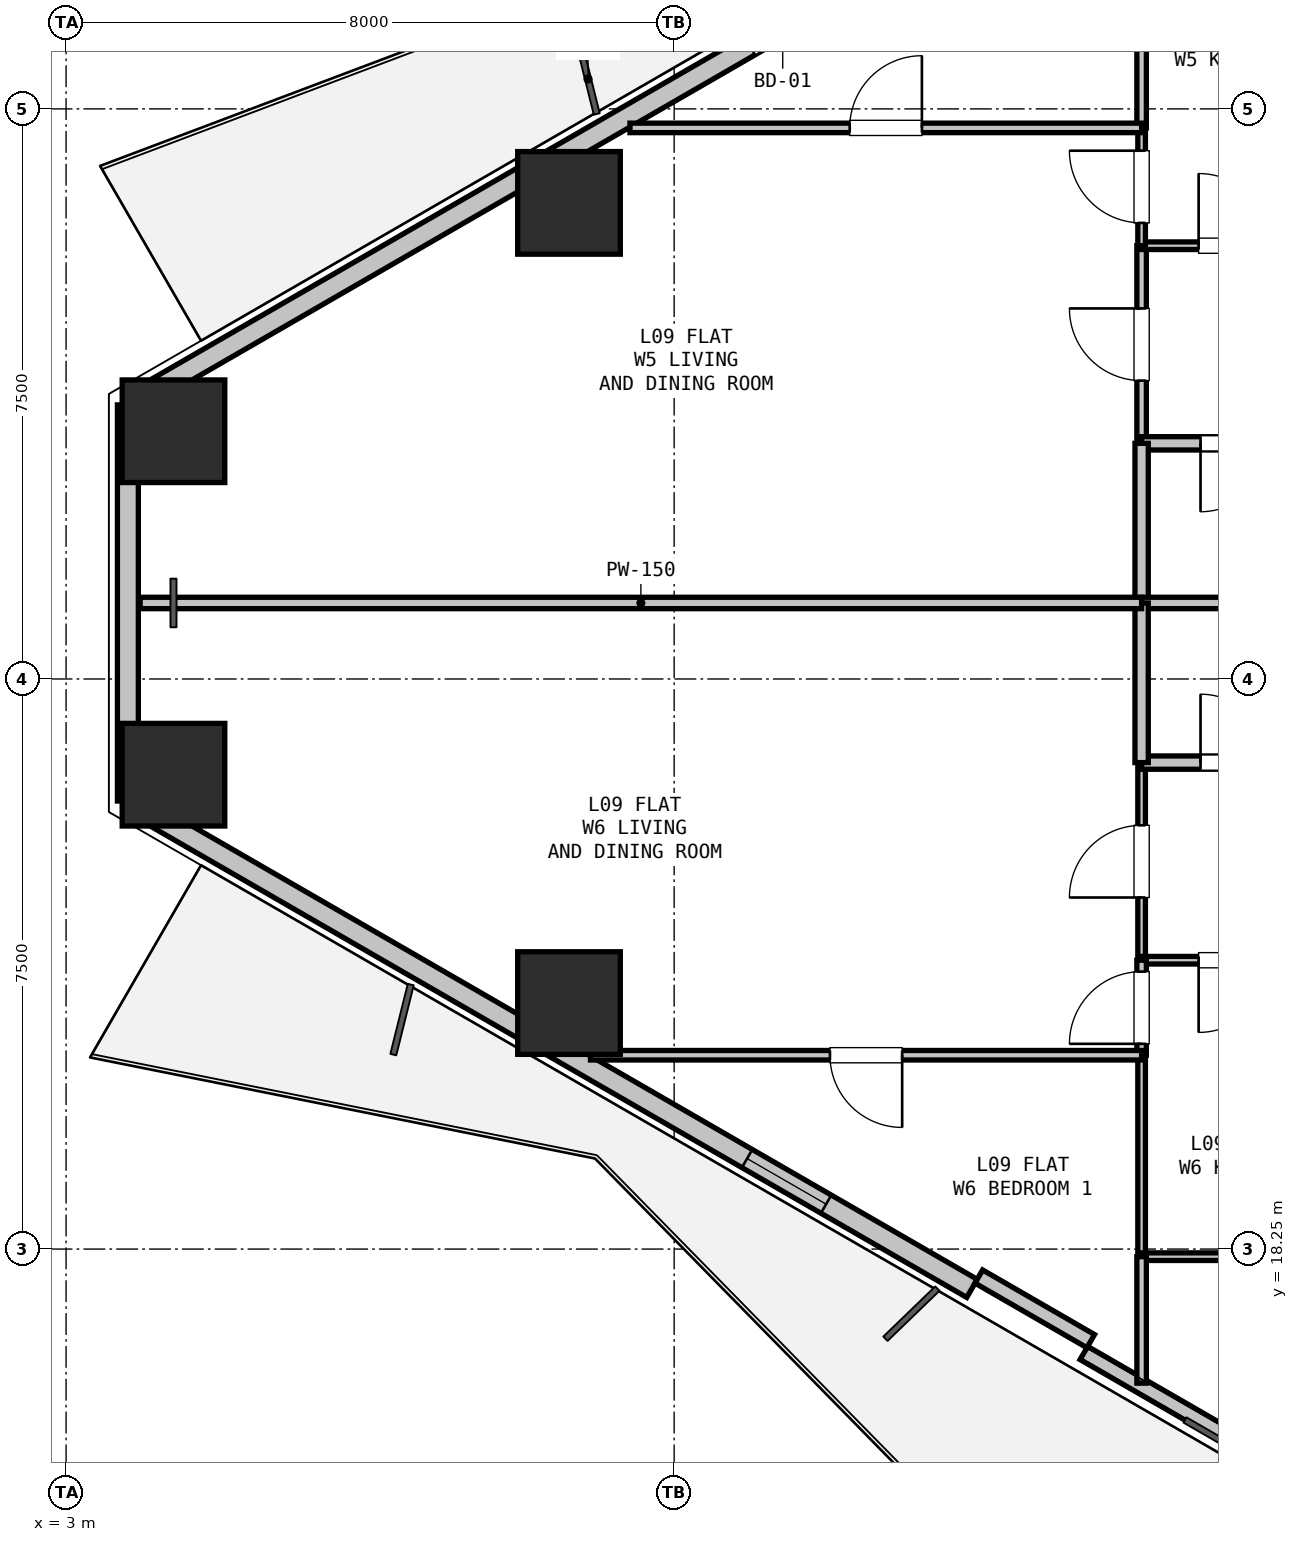
"""IFC4 building model, lengths in metres.
Left out: names, types, materials, properties, quantities, classifications, styles, units other than length and angle.
Written with IfcOpenShell. Run it as: python <this file> out.ifc"""

import sys

from ifc_helpers import new_model, si_unit, direction, frame, frame_2d, origin, origin_2d, place, context, subcontext, project, spatial, rectangle, hollow_rectangle, extrude, element, fill, save


model = new_model("IFC4")
c1 = context("Model", 3, precision=1e-05, world=origin(), true_north=direction((0.0, 1.0)))
c2 = subcontext(c1, "Body", "Model", "MODEL_VIEW")
j1 = project(units=[si_unit("LENGTHUNIT", "METRE"), si_unit("PLANEANGLEUNIT", "RADIAN")], contexts=[c1])
p1 = place(None, origin())
s1 = spatial("IfcSite", under=j1, at=p1, CompositionType="ELEMENT")
p2 = place(p1, origin())
s2 = spatial("IfcBuilding", under=s1, at=p2, CompositionType="ELEMENT")
p3 = place(p2, frame((0.0, 0.0, 35.7)))
s3 = spatial("IfcBuildingStorey", under=s2, at=p3, CompositionType="ELEMENT", Elevation=35.7)
for number, where, z_axis, x_axis in (
    (1, (4.413, 29.009, 0.0), (0.0, 0.0, 1.0), (1.0, 0.0, 0.0)),
    (2, (9.617, 32.014, 0.0), (0.0, 0.0, 1.0), (1.0, 0.0, 0.0)),
    (3, (9.617, 21.486, 0.0), (0.0, 0.0, 1.0), (1.0, 0.0, 0.0)),
    (4, (4.413, 24.491, 0.0), (0.0, 0.0, 1.0), (1.0, 0.0, 0.0)),
):
    element("IfcColumn", number, at=place(p3, frame(where, z_axis=z_axis, x_axis=x_axis)), inside=s3, PredefinedType="COLUMN", context=c2, shape_type="SweptSolid", body=[
        extrude(hollow_rectangle(XDim=1.35, YDim=1.35, WallThickness=0.036, at=origin_2d()), origin(), (0.0, 0.0, 1.0), 3.3),
    ])
p4 = place(p3, frame((3.813, 24.144, 0.0), z_axis=(0.0, 0.0, 1.0), x_axis=(0.0, 1.0, 0.0)))
e5 = element("IfcWall", 5, at=p4, inside=s3, PredefinedType="SOLIDWALL", context=c2, shape_type="SweptSolid", body=[
    extrude(rectangle(XDim=5.211, YDim=0.275, at=frame_2d((2.606, 0.0))), origin(), (0.0, 0.0, 1.0), 2.66),
])
p5 = place(p3, frame((3.943, 29.431, 0.0), z_axis=(0.0, 0.0, 1.0), x_axis=(0.866027105532, 0.499997052475, 0.0)))
e6 = element("IfcWall", 6, at=p5, inside=s3, PredefinedType="SOLIDWALL", context=c2, shape_type="SweptSolid", body=[
    extrude(rectangle(XDim=12.673, YDim=0.275, at=frame_2d((6.336, 0.0))), origin(), (0.0, 0.0, 1.0), 2.66),
])
p6 = place(p5, frame((9.298, 0.0, 0.0)))
e7 = element("IfcOpeningElement", 7, at=p6, cuts=e6, PredefinedType="OPENING", context=c2, shape_type="SweptSolid", body=[
    extrude(rectangle(XDim=1.0, YDim=2.1, at=frame_2d((0.5, 1.05))), frame((0.0, 0.147, 0.0), z_axis=(0.0, -1.0, 0.0), x_axis=(1.0, 0.0, 0.0)), (0.0, 0.0, 1.0), 0.295),
])
p7 = place(p3, frame((26.76, 10.896, 0.0), z_axis=(0.0, 0.0, 1.0), x_axis=(-0.866027351828, 0.499996625875, 0.0)))
e8 = element("IfcWall", 8, at=p7, inside=s3, PredefinedType="PARAPET", context=c2, shape_type="SweptSolid", body=[
    extrude(rectangle(XDim=11.973, YDim=0.2, at=frame_2d((5.987, 0.0))), origin(), (0.0, 0.0, 1.0), 0.2),
])
p8 = place(p3, frame((14.918, 17.733, 0.0), z_axis=(0.0, 0.0, 1.0), x_axis=(-0.866027105532, 0.499997052475, 0.0)))
e9 = element("IfcWall", 9, at=p8, inside=s3, PredefinedType="SOLIDWALL", context=c2, shape_type="SweptSolid", body=[
    extrude(rectangle(XDim=12.673, YDim=0.275, at=frame_2d((6.336, 0.0))), origin(), (0.0, 0.0, 1.0), 2.66),
])
p9 = place(p8, frame((2.216, 0.0, 0.9)))
e10 = element("IfcOpeningElement", 10, at=p9, cuts=e9, PredefinedType="OPENING", context=c2, shape_type="SweptSolid", body=[
    extrude(rectangle(XDim=1.2, YDim=1.4, at=frame_2d((0.6, 0.7))), frame((0.0, 0.147, 0.0), z_axis=(0.0, -1.0, 0.0), x_axis=(1.0, 0.0, 0.0)), (0.0, 0.0, 1.0), 0.295),
])
p10 = place(p3, frame((16.48, 17.039, 0.0), z_axis=(0.0, 0.0, 1.0), x_axis=(-0.86605165483, 0.499954529098, 0.0)))
e11 = element("IfcWall", 11, at=p10, inside=s3, PredefinedType="PARAPET", context=c2, shape_type="SweptSolid", body=[
    extrude(rectangle(XDim=1.7, YDim=0.2, at=frame_2d((0.85, 0.0))), origin(), (0.0, 0.0, 1.0), 2.66),
])
p11 = place(p3, frame((17.15, 28.85, 0.0), z_axis=(0.0, 0.0, 1.0), x_axis=(0.0, 1.0, 0.0)))
e12 = element("IfcWall", 12, at=p11, inside=s3, PredefinedType="PARTITIONING", context=c2, shape_type="SweptSolid", body=[
    extrude(rectangle(XDim=2.6, YDim=0.125, at=frame_2d((1.3, 0.0))), origin(), (0.0, 0.0, 1.0), 3.04),
])
p12 = place(p11, frame((0.825, 0.0, 0.0)))
e13 = element("IfcOpeningElement", 13, at=p12, cuts=e12, PredefinedType="OPENING", context=c2, shape_type="SweptSolid", body=[
    extrude(rectangle(XDim=0.95, YDim=2.1, at=frame_2d((0.475, 1.05))), frame((0.0, 0.073, 0.0), z_axis=(0.0, -1.0, 0.0), x_axis=(1.0, 0.0, 0.0)), (0.0, 0.0, 1.0), 0.145),
])
p13 = place(p3, frame((17.15, 31.45, 0.0), z_axis=(0.0, 0.0, 1.0), x_axis=(1.0, 0.0, 0.0)))
e14 = element("IfcWall", 14, at=p13, inside=s3, PredefinedType="PARTITIONING", context=c2, shape_type="SweptSolid", body=[
    extrude(rectangle(XDim=2.45, YDim=0.1, at=frame_2d((1.225, 0.0))), origin(), (0.0, 0.0, 1.0), 3.04),
])
p14 = place(p13, frame((0.75, 0.0, 0.0)))
e15 = element("IfcOpeningElement", 15, at=p14, cuts=e14, PredefinedType="OPENING", context=c2, shape_type="SweptSolid", body=[
    extrude(rectangle(XDim=0.95, YDim=2.1, at=frame_2d((0.475, 1.05))), frame((0.0, 0.06, 0.0), z_axis=(0.0, -1.0, 0.0), x_axis=(1.0, 0.0, 0.0)), (0.0, 0.0, 1.0), 0.12),
])
p15 = place(p3, frame((19.6, 28.85, 0.0), z_axis=(0.0, 0.0, 1.0), x_axis=(-1.0, 0.0, 0.0)))
e16 = element("IfcWall", 16, at=p15, inside=s3, PredefinedType="PLUMBINGWALL", context=c2, shape_type="SweptSolid", body=[
    extrude(rectangle(XDim=2.45, YDim=0.175, at=frame_2d((1.225, 0.0))), origin(), (0.0, 0.0, 1.0), 3.04),
])
p16 = place(p15, frame((0.775, 0.0, 0.0)))
e17 = element("IfcOpeningElement", 17, at=p16, cuts=e16, PredefinedType="OPENING", context=c2, shape_type="SweptSolid", body=[
    extrude(rectangle(XDim=0.9, YDim=2.1, at=frame_2d((0.45, 1.05))), frame((0.0, 0.097, 0.0), z_axis=(0.0, -1.0, 0.0), x_axis=(1.0, 0.0, 0.0)), (0.0, 0.0, 1.0), 0.195),
])
p17 = place(p3, frame((17.15, 22.05, 0.0), z_axis=(0.0, 0.0, 1.0), x_axis=(0.0, 1.0, 0.0)))
e18 = element("IfcWall", 18, at=p17, inside=s3, PredefinedType="PARTITIONING", context=c2, shape_type="SweptSolid", body=[
    extrude(rectangle(XDim=2.6, YDim=0.1, at=frame_2d((1.3, 0.0))), origin(), (0.0, 0.0, 1.0), 3.04),
])
p18 = place(p17, frame((0.825, 0.0, 0.0)))
e19 = element("IfcOpeningElement", 19, at=p18, cuts=e18, PredefinedType="OPENING", context=c2, shape_type="SweptSolid", body=[
    extrude(rectangle(XDim=0.95, YDim=2.1, at=frame_2d((0.475, 1.05))), frame((0.0, 0.06, 0.0), z_axis=(0.0, -1.0, 0.0), x_axis=(1.0, 0.0, 0.0)), (0.0, 0.0, 1.0), 0.12),
])
p19 = place(p3, frame((17.15, 24.65, 0.0), z_axis=(0.0, 0.0, 1.0), x_axis=(1.0, 0.0, 0.0)))
e20 = element("IfcWall", 20, at=p19, inside=s3, PredefinedType="PLUMBINGWALL", context=c2, shape_type="SweptSolid", body=[
    extrude(rectangle(XDim=2.45, YDim=0.175, at=frame_2d((1.225, 0.0))), origin(), (0.0, 0.0, 1.0), 3.04),
])
p20 = place(p19, frame((0.775, 0.0, 0.0)))
e21 = element("IfcOpeningElement", 21, at=p20, cuts=e20, PredefinedType="OPENING", context=c2, shape_type="SweptSolid", body=[
    extrude(rectangle(XDim=0.9, YDim=2.1, at=frame_2d((0.45, 1.05))), frame((0.0, 0.097, 0.0), z_axis=(0.0, -1.0, 0.0), x_axis=(1.0, 0.0, 0.0)), (0.0, 0.0, 1.0), 0.195),
])
p21 = place(p3, frame((19.6, 22.05, 0.0), z_axis=(0.0, 0.0, 1.0), x_axis=(-1.0, 0.0, 0.0)))
e22 = element("IfcWall", 22, at=p21, inside=s3, PredefinedType="PARTITIONING", context=c2, shape_type="SweptSolid", body=[
    extrude(rectangle(XDim=2.45, YDim=0.1, at=frame_2d((1.225, 0.0))), origin(), (0.0, 0.0, 1.0), 3.04),
])
p22 = place(p21, frame((0.75, 0.0, 0.0)))
e23 = element("IfcOpeningElement", 23, at=p22, cuts=e22, PredefinedType="OPENING", context=c2, shape_type="SweptSolid", body=[
    extrude(rectangle(XDim=0.95, YDim=2.1, at=frame_2d((0.475, 1.05))), frame((0.0, 0.06, 0.0), z_axis=(0.0, -1.0, 0.0), x_axis=(1.0, 0.0, 0.0)), (0.0, 0.0, 1.0), 0.12),
])
p23 = place(p3, frame((17.15, 26.75, 0.0), z_axis=(0.0, 0.0, 1.0), x_axis=(0.0, 1.0, 0.0)))
e24 = element("IfcWall", 24, at=p23, inside=s3, PredefinedType="PLUMBINGWALL", context=c2, shape_type="SweptSolid", body=[
    extrude(rectangle(XDim=2.1, YDim=0.175, at=frame_2d((1.05, 0.0))), origin(), (0.0, 0.0, 1.0), 3.04),
])
p24 = place(p3, frame((19.6, 26.75, 0.0), z_axis=(0.0, 0.0, 1.0), x_axis=(-1.0, 0.0, 0.0)))
e25 = element("IfcWall", 25, at=p24, inside=s3, PredefinedType="PARTITIONING", context=c2, shape_type="SweptSolid", body=[
    extrude(rectangle(XDim=2.45, YDim=0.15, at=frame_2d((1.225, 0.0))), origin(), (0.0, 0.0, 1.0), 3.04),
])
p25 = place(p3, frame((17.15, 31.45, 0.0), z_axis=(0.0, 0.0, 1.0), x_axis=(0.0, 1.0, 0.0)))
e26 = element("IfcWall", 26, at=p25, inside=s3, PredefinedType="PARTITIONING", context=c2, shape_type="SweptSolid", body=[
    extrude(rectangle(XDim=1.55, YDim=0.1, at=frame_2d((0.775, 0.0))), origin(), (0.0, 0.0, 1.0), 2.338),
])
p26 = place(p25, frame((0.3, 0.0, 0.0)))
e27 = element("IfcOpeningElement", 27, at=p26, cuts=e26, PredefinedType="OPENING", context=c2, shape_type="SweptSolid", body=[
    extrude(rectangle(XDim=0.95, YDim=2.1, at=frame_2d((0.475, 1.05))), frame((0.0, 0.06, 0.0), z_axis=(0.0, -1.0, 0.0), x_axis=(1.0, 0.0, 0.0)), (0.0, 0.0, 1.0), 0.12),
])
p27 = place(p3, frame((17.15, 33.0, 0.0), z_axis=(0.0, 0.0, 1.0), x_axis=(0.0, 1.0, 0.0)))
e28 = element("IfcWall", 28, at=p27, inside=s3, PredefinedType="PARTITIONING", context=c2, shape_type="SweptSolid", body=[
    extrude(rectangle(XDim=2.35, YDim=0.125, at=frame_2d((1.175, 0.0))), origin(), (0.0, 0.0, 1.0), 3.04),
])
p28 = place(p3, frame((17.15, 24.65, 0.0), z_axis=(0.0, 0.0, 1.0), x_axis=(0.0, 1.0, 0.0)))
e29 = element("IfcWall", 29, at=p28, inside=s3, PredefinedType="PLUMBINGWALL", context=c2, shape_type="SweptSolid", body=[
    extrude(rectangle(XDim=2.1, YDim=0.175, at=frame_2d((1.05, 0.0))), origin(), (0.0, 0.0, 1.0), 3.04),
])
p29 = place(p3, frame((17.15, 18.15, 0.0), z_axis=(0.0, 0.0, 1.0), x_axis=(0.0, 1.0, 0.0)))
e30 = element("IfcWall", 30, at=p29, inside=s3, PredefinedType="PARTITIONING", context=c2, shape_type="SweptSolid", body=[
    extrude(rectangle(XDim=2.65, YDim=0.1, at=frame_2d((1.325, 0.0))), origin(), (0.0, 0.0, 1.0), 3.04),
])
p30 = place(p3, frame((17.15, 20.8, 0.0), z_axis=(0.0, 0.0, 1.0), x_axis=(0.0, 1.0, 0.0)))
e31 = element("IfcWall", 31, at=p30, inside=s3, PredefinedType="PARTITIONING", context=c2, shape_type="SweptSolid", body=[
    extrude(rectangle(XDim=1.25, YDim=0.125, at=frame_2d((0.625, 0.0))), origin(), (0.0, 0.0, 1.0), 2.338),
])
p31 = place(p30, frame((0.15, 0.0, 0.0)))
e32 = element("IfcOpeningElement", 32, at=p31, cuts=e31, PredefinedType="OPENING", context=c2, shape_type="SweptSolid", body=[
    extrude(rectangle(XDim=0.95, YDim=2.1, at=frame_2d((0.475, 1.05))), frame((0.0, 0.073, 0.0), z_axis=(0.0, -1.0, 0.0), x_axis=(1.0, 0.0, 0.0)), (0.0, 0.0, 1.0), 0.145),
])
p32 = place(p3, frame((19.6, 18.15, 0.0), z_axis=(0.0, 0.0, 1.0), x_axis=(-1.0, 0.0, 0.0)))
e33 = element("IfcWall", 33, at=p32, inside=s3, PredefinedType="PARTITIONING", context=c2, shape_type="SweptSolid", body=[
    extrude(rectangle(XDim=2.45, YDim=0.1, at=frame_2d((1.225, 0.0))), origin(), (0.0, 0.0, 1.0), 3.04),
])
p33 = place(p3, frame((10.419, 33.0, 0.0), z_axis=(0.0, 0.0, 1.0), x_axis=(1.0, 0.0, 0.0)))
e34 = element("IfcWall", 34, at=p33, inside=s3, PredefinedType="PARTITIONING", context=c2, shape_type="SweptSolid", body=[
    extrude(rectangle(XDim=6.731, YDim=0.125, at=frame_2d((3.365, 0.0))), origin(), (0.0, 0.0, 1.0), 2.365),
])
p34 = place(p33, frame((2.89, 0.0, 0.0)))
e35 = element("IfcOpeningElement", 35, at=p34, cuts=e34, PredefinedType="OPENING", context=c2, shape_type="SweptSolid", body=[
    extrude(rectangle(XDim=0.95, YDim=2.1, at=frame_2d((0.475, 1.05))), frame((0.0, 0.073, 0.0), z_axis=(0.0, -1.0, 0.0), x_axis=(1.0, 0.0, 0.0)), (0.0, 0.0, 1.0), 0.145),
])
p35 = place(p3, frame((17.15, 26.75, 0.0), z_axis=(0.0, 0.0, 1.0), x_axis=(-1.0, 0.0, 0.0)))
e36 = element("IfcWall", 36, at=p35, inside=s3, PredefinedType="PARTITIONING", context=c2, shape_type="SweptSolid", body=[
    extrude(rectangle(XDim=13.175, YDim=0.15, at=frame_2d((6.588, 0.0))), origin(), (0.0, 0.0, 1.0), 2.65),
])
p36 = place(p3, frame((3.813, 29.356, 0.0), z_axis=(0.0, 0.0, 1.0), x_axis=(0.866131372301, 0.499816412211, 0.0)))
e37 = element("IfcWall", 37, at=p36, inside=s3, PredefinedType="PARTITIONING", context=c2, shape_type="SweptSolid", body=[
    extrude(rectangle(XDim=0.15, YDim=0.125, at=frame_2d((0.075, 0.0))), origin(), (0.0, 0.0, 1.0), 3.04),
])
p37 = place(p3, frame((17.15, 20.8, 0.0), z_axis=(0.0, 0.0, 1.0), x_axis=(-1.0, 0.0, 0.0)))
e38 = element("IfcWall", 38, at=p37, inside=s3, PredefinedType="PARTITIONING", context=c2, shape_type="SweptSolid", body=[
    extrude(rectangle(XDim=7.25, YDim=0.125, at=frame_2d((3.625, 0.0))), origin(), (0.0, 0.0, 1.0), 2.365),
])
p38 = place(p37, frame((3.15, 0.0, 0.0)))
e39 = element("IfcOpeningElement", 39, at=p38, cuts=e38, PredefinedType="OPENING", context=c2, shape_type="SweptSolid", body=[
    extrude(rectangle(XDim=0.95, YDim=2.1, at=frame_2d((0.475, 1.05))), frame((0.0, 0.073, 0.0), z_axis=(0.0, -1.0, 0.0), x_axis=(1.0, 0.0, 0.0)), (0.0, 0.0, 1.0), 0.145),
])
p39 = place(p3, frame((3.943, 24.069, 0.0), z_axis=(0.0, 0.0, 1.0), x_axis=(-0.866131372301, 0.499816412211, 0.0)))
e40 = element("IfcWall", 40, at=p39, inside=s3, PredefinedType="PARTITIONING", context=c2, shape_type="SweptSolid", body=[
    extrude(rectangle(XDim=0.15, YDim=0.1, at=frame_2d((0.075, 0.0))), origin(), (0.0, 0.0, 1.0), 3.04),
])
p40 = place(p3, frame((17.15, 18.15, 0.0), z_axis=(0.0, 0.0, 1.0), x_axis=(0.0, -1.0, 0.0)))
e41 = element("IfcWall", 41, at=p40, inside=s3, PredefinedType="PARTITIONING", context=c2, shape_type="SweptSolid", body=[
    extrude(rectangle(XDim=1.664, YDim=0.125, at=frame_2d((0.832, 0.0))), origin(), (0.0, 0.0, 1.0), 2.365),
])
p41 = place(p9, origin())
e42 = element("IfcWindow", 42, at=p41, inside=s3, PartitioningType="SINGLE_PANEL", PredefinedType="WINDOW", context=c2, shape_type="SweptSolid", body=[
    extrude(rectangle(XDim=1.2, YDim=1.4, at=frame_2d((0.6, 0.7))), frame((0.0, 0.03, 0.0), z_axis=(0.0, -1.0, 0.0), x_axis=(1.0, 0.0, 0.0)), (0.0, 0.0, 1.0), 0.06),
])
fill(e10, e42)
p42 = place(p16, origin())
e43 = element("IfcDoor", 43, at=p42, inside=s3, OperationType="SINGLE_SWING_RIGHT", PredefinedType="DOOR", context=c2, shape_type="SweptSolid", body=[
    extrude(rectangle(XDim=0.9, YDim=2.1, at=frame_2d((0.45, 1.05))), frame((0.0, 0.025, 0.0), z_axis=(0.0, -1.0, 0.0), x_axis=(1.0, 0.0, 0.0)), (0.0, 0.0, 1.0), 0.05),
])
fill(e17, e43)
p43 = place(p14, origin())
e44 = element("IfcDoor", 44, at=p43, inside=s3, OperationType="SINGLE_SWING_LEFT", PredefinedType="DOOR", context=c2, shape_type="SweptSolid", body=[
    extrude(rectangle(XDim=0.95, YDim=2.1, at=frame_2d((0.475, 1.05))), frame((0.0, 0.025, 0.0), z_axis=(0.0, -1.0, 0.0), x_axis=(1.0, 0.0, 0.0)), (0.0, 0.0, 1.0), 0.05),
])
fill(e15, e44)
p44 = place(p12, origin())
e45 = element("IfcDoor", 45, at=p44, inside=s3, OperationType="SINGLE_SWING_RIGHT", PredefinedType="DOOR", context=c2, shape_type="SweptSolid", body=[
    extrude(rectangle(XDim=0.95, YDim=2.1, at=frame_2d((0.475, 1.05))), frame((0.0, 0.025, 0.0), z_axis=(0.0, -1.0, 0.0), x_axis=(1.0, 0.0, 0.0)), (0.0, 0.0, 1.0), 0.05),
])
fill(e13, e45)
p45 = place(p20, origin())
e46 = element("IfcDoor", 46, at=p45, inside=s3, OperationType="SINGLE_SWING_LEFT", PredefinedType="DOOR", context=c2, shape_type="SweptSolid", body=[
    extrude(rectangle(XDim=0.9, YDim=2.1, at=frame_2d((0.45, 1.05))), frame((0.0, 0.025, 0.0), z_axis=(0.0, -1.0, 0.0), x_axis=(1.0, 0.0, 0.0)), (0.0, 0.0, 1.0), 0.05),
])
fill(e21, e46)
p46 = place(p22, origin())
e47 = element("IfcDoor", 47, at=p46, inside=s3, OperationType="SINGLE_SWING_RIGHT", PredefinedType="DOOR", context=c2, shape_type="SweptSolid", body=[
    extrude(rectangle(XDim=0.95, YDim=2.1, at=frame_2d((0.475, 1.05))), frame((0.0, 0.025, 0.0), z_axis=(0.0, -1.0, 0.0), x_axis=(1.0, 0.0, 0.0)), (0.0, 0.0, 1.0), 0.05),
])
fill(e23, e47)
p47 = place(p18, origin())
e48 = element("IfcDoor", 48, at=p47, inside=s3, OperationType="SINGLE_SWING_LEFT", PredefinedType="DOOR", context=c2, shape_type="SweptSolid", body=[
    extrude(rectangle(XDim=0.95, YDim=2.1, at=frame_2d((0.475, 1.05))), frame((0.0, 0.025, 0.0), z_axis=(0.0, -1.0, 0.0), x_axis=(1.0, 0.0, 0.0)), (0.0, 0.0, 1.0), 0.05),
])
fill(e19, e48)
p48 = place(p26, origin())
e49 = element("IfcDoor", 49, at=p48, inside=s3, OperationType="SINGLE_SWING_RIGHT", PredefinedType="DOOR", context=c2, shape_type="SweptSolid", body=[
    extrude(rectangle(XDim=0.95, YDim=2.1, at=frame_2d((0.475, 1.05))), frame((0.0, 0.025, 0.0), z_axis=(0.0, -1.0, 0.0), x_axis=(1.0, 0.0, 0.0)), (0.0, 0.0, 1.0), 0.05),
])
fill(e27, e49)
p49 = place(p31, origin())
e50 = element("IfcDoor", 50, at=p49, inside=s3, OperationType="SINGLE_SWING_LEFT", PredefinedType="DOOR", context=c2, shape_type="SweptSolid", body=[
    extrude(rectangle(XDim=0.95, YDim=2.1, at=frame_2d((0.475, 1.05))), frame((0.0, 0.025, 0.0), z_axis=(0.0, -1.0, 0.0), x_axis=(1.0, 0.0, 0.0)), (0.0, 0.0, 1.0), 0.05),
])
fill(e32, e50)
p50 = place(p34, origin())
e51 = element("IfcDoor", 51, at=p50, inside=s3, OperationType="SINGLE_SWING_RIGHT", PredefinedType="DOOR", context=c2, shape_type="SweptSolid", body=[
    extrude(rectangle(XDim=0.95, YDim=2.1, at=frame_2d((0.475, 1.05))), frame((0.0, 0.025, 0.0), z_axis=(0.0, -1.0, 0.0), x_axis=(1.0, 0.0, 0.0)), (0.0, 0.0, 1.0), 0.05),
])
fill(e35, e51)
p51 = place(p38, origin())
e52 = element("IfcDoor", 52, at=p51, inside=s3, OperationType="SINGLE_SWING_LEFT", PredefinedType="DOOR", context=c2, shape_type="SweptSolid", body=[
    extrude(rectangle(XDim=0.95, YDim=2.1, at=frame_2d((0.475, 1.05))), frame((0.0, 0.025, 0.0), z_axis=(0.0, -1.0, 0.0), x_axis=(1.0, 0.0, 0.0)), (0.0, 0.0, 1.0), 0.05),
])
fill(e39, e52)
save(model, sys.argv[1])
